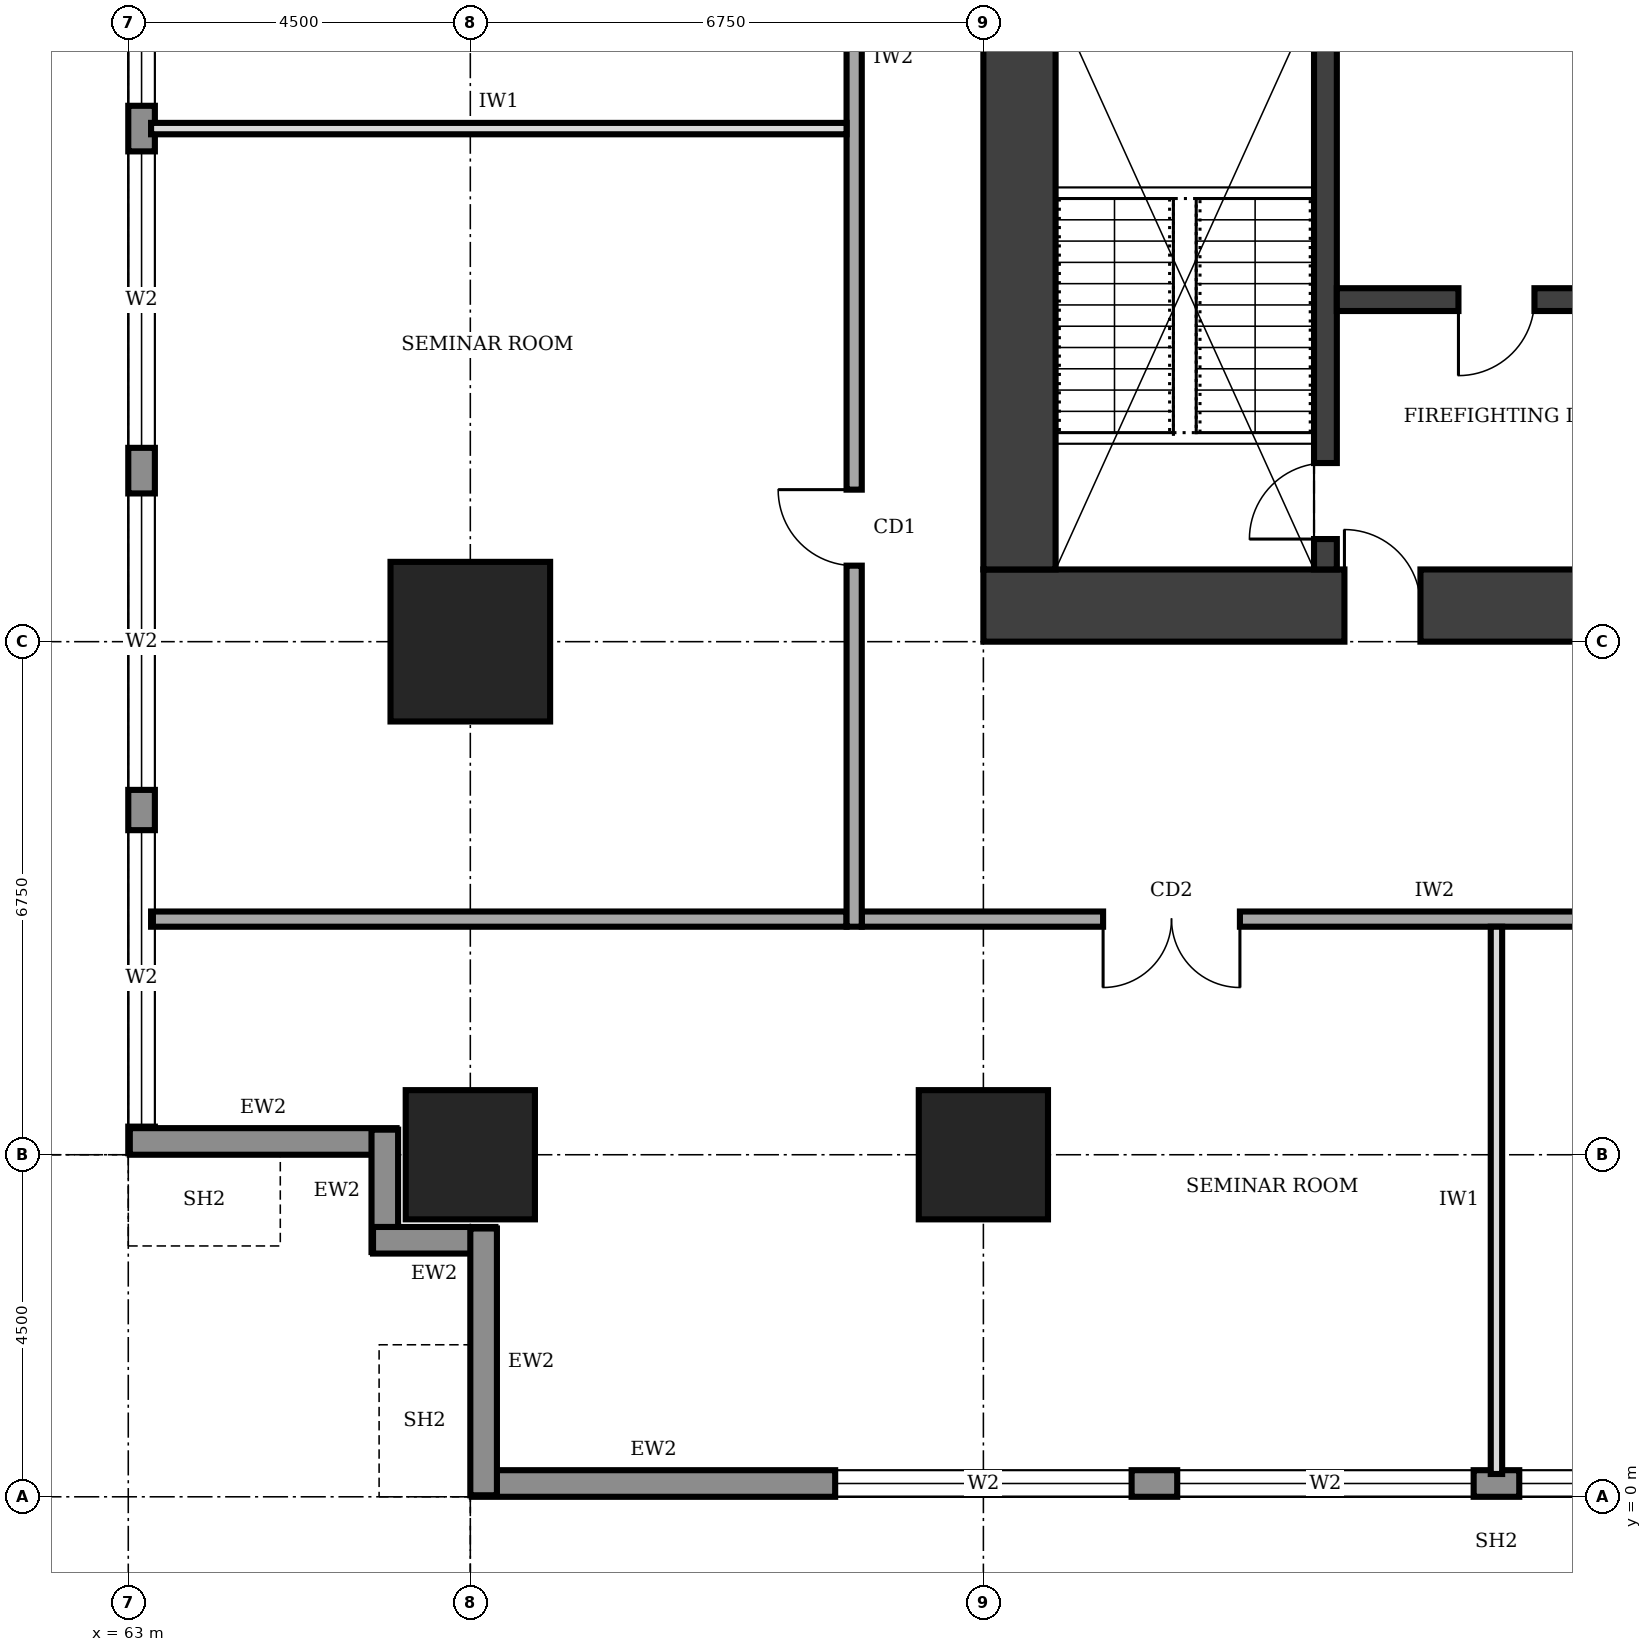
"""IFC4 building model, lengths in metres.
Left out: names, types, materials, properties, quantities, classifications, styles, units other than length and angle.
Written with IfcOpenShell. Run it as: python <this file> out.ifc"""

import sys

from ifc_helpers import new_model, si_unit, direction, frame, frame_2d, origin, origin_2d, place, context, subcontext, project, spatial, rectangle, extrude, element, fill, save


model = new_model("IFC4")
c1 = context("Model", 3, precision=1e-05, world=origin(), true_north=direction((0.0, 1.0)))
c2 = subcontext(c1, "Body", "Model", "MODEL_VIEW")
j1 = project(units=[si_unit("LENGTHUNIT", "METRE"), si_unit("PLANEANGLEUNIT", "RADIAN")], contexts=[c1])
p1 = place(None, origin())
s1 = spatial("IfcSite", under=j1, at=p1, CompositionType="ELEMENT")
p2 = place(p1, origin())
s2 = spatial("IfcBuilding", under=s1, at=p2, CompositionType="ELEMENT")
p3 = place(p2, frame((0.0, 0.0, 65.0)))
s3 = spatial("IfcBuildingStorey", under=s2, at=p3, CompositionType="ELEMENT", Elevation=65.0)
p4 = place(p3, frame((74.25, 11.725, 0.0), z_axis=(0.0, 0.0, 1.0), x_axis=(1.0, 0.0, 0.0)))
e1 = element("IfcWall", 1, at=p4, inside=s3, PredefinedType="SHEAR", context=c2, shape_type="SweptSolid", body=[
    extrude(rectangle(XDim=13.5, YDim=0.95, at=frame_2d((6.75, 0.0))), origin(), (0.0, 0.0, 1.0), 4.0),
])
p5 = place(p4, frame((4.75, 0.0, 0.0)))
e2 = element("IfcOpeningElement", 2, at=p5, cuts=e1, PredefinedType="OPENING", context=c2, shape_type="SweptSolid", body=[
    extrude(rectangle(XDim=1.0, YDim=2.1, at=frame_2d((0.5, 1.05))), frame((0.0, 0.485, 0.0), z_axis=(0.0, -1.0, 0.0), x_axis=(1.0, 0.0, 0.0)), (0.0, 0.0, 1.0), 0.97),
])
p6 = place(p3, frame((74.725, 28.3, 0.0), z_axis=(0.0, 0.0, 1.0), x_axis=(0.0, -1.0, 0.0)))
e3 = element("IfcWall", 3, at=p6, inside=s3, PredefinedType="SHEAR", context=c2, shape_type="SweptSolid", body=[
    extrude(rectangle(XDim=16.1, YDim=0.95, at=frame_2d((8.05, 0.0))), origin(), (0.0, 0.0, 1.0), 4.0),
])
p7 = place(p3, frame((78.75, 12.2, 0.0), z_axis=(0.0, 0.0, 1.0), x_axis=(0.0, 1.0, 0.0)))
e4 = element("IfcWall", 4, at=p7, inside=s3, PredefinedType="SHEAR", context=c2, shape_type="SweptSolid", body=[
    extrude(rectangle(XDim=16.1, YDim=0.3, at=frame_2d((8.05, 0.0))), origin(), (0.0, 0.0, 1.0), 4.0),
])
p8 = place(p7, frame((0.4, 0.0, 0.0)))
e5 = element("IfcOpeningElement", 5, at=p8, cuts=e4, PredefinedType="OPENING", context=c2, shape_type="SweptSolid", body=[
    extrude(rectangle(XDim=1.0, YDim=2.1, at=frame_2d((0.5, 1.05))), frame((0.0, 0.16, 0.0), z_axis=(0.0, -1.0, 0.0), x_axis=(1.0, 0.0, 0.0)), (0.0, 0.0, 1.0), 0.32),
])
p9 = place(p7, frame((9.0, 0.0, 0.0)))
e6 = element("IfcOpeningElement", 6, at=p9, cuts=e4, PredefinedType="OPENING", context=c2, shape_type="SweptSolid", body=[
    extrude(rectangle(XDim=1.1, YDim=2.1, at=frame_2d((0.55, 1.05))), frame((0.0, 0.16, 0.0), z_axis=(0.0, -1.0, 0.0), x_axis=(1.0, 0.0, 0.0)), (0.0, 0.0, 1.0), 0.32),
])
p10 = place(p7, frame((12.0, 0.0, 0.0)))
e7 = element("IfcOpeningElement", 7, at=p10, cuts=e4, PredefinedType="OPENING", context=c2, shape_type="SweptSolid", body=[
    extrude(rectangle(XDim=1.1, YDim=2.1, at=frame_2d((0.55, 1.05))), frame((0.0, 0.16, 0.0), z_axis=(0.0, -1.0, 0.0), x_axis=(1.0, 0.0, 0.0)), (0.0, 0.0, 1.0), 0.32),
])
p11 = place(p3, frame((78.9, 15.75, 0.0), z_axis=(0.0, 0.0, 1.0), x_axis=(1.0, 0.0, 0.0)))
e8 = element("IfcWall", 8, at=p11, inside=s3, PredefinedType="SHEAR", context=c2, shape_type="SweptSolid", body=[
    extrude(rectangle(XDim=4.2, YDim=0.3, at=frame_2d((2.1, 0.0))), origin(), (0.0, 0.0, 1.0), 4.0),
])
p12 = place(p11, frame((1.6, 0.0, 0.0)))
e9 = element("IfcOpeningElement", 9, at=p12, cuts=e8, PredefinedType="OPENING", context=c2, shape_type="SweptSolid", body=[
    extrude(rectangle(XDim=1.0, YDim=2.1, at=frame_2d((0.5, 1.05))), frame((0.0, 0.16, 0.0), z_axis=(0.0, -1.0, 0.0), x_axis=(1.0, 0.0, 0.0)), (0.0, 0.0, 1.0), 0.32),
])
for number, where, z_axis, x_axis in (
    (10, (67.5, 4.5, 0.0), (0.0, 0.0, 1.0), (1.0, 0.0, 0.0)),
    (11, (74.25, 4.5, 0.0), (0.0, 0.0, 1.0), (1.0, 0.0, 0.0)),
):
    element("IfcColumn", number, at=place(p3, frame(where, z_axis=z_axis, x_axis=x_axis)), inside=s3, PredefinedType="COLUMN", context=c2, shape_type="SweptSolid", body=[
        extrude(rectangle(XDim=1.7, YDim=1.7, at=origin_2d()), origin(), (0.0, 0.0, 1.0), 4.0),
    ])
p13 = place(p3, frame((67.5, 11.25, 0.0), z_axis=(0.0, 0.0, 1.0), x_axis=(1.0, 0.0, 0.0)))
e12 = element("IfcColumn", 12, at=p13, inside=s3, PredefinedType="COLUMN", context=c2, shape_type="SweptSolid", body=[
    extrude(rectangle(XDim=2.1, YDim=2.1, at=origin_2d()), origin(), (0.0, 0.0, 1.0), 4.0),
])
p14 = place(p3, frame((67.52, 0.175, 0.0), z_axis=(0.0, 0.0, 1.0), x_axis=(1.0, 0.0, 0.0)))
e13 = element("IfcWall", 13, at=p14, inside=s3, PredefinedType="STANDARD", context=c2, shape_type="SweptSolid", body=[
    extrude(rectangle(XDim=26.96, YDim=0.35, at=frame_2d((13.48, 0.0))), origin(), (0.0, 0.0, 1.0), 3.75),
])
p15 = place(p14, frame((4.78, 0.0, 0.6)))
e14 = element("IfcOpeningElement", 14, at=p15, cuts=e13, PredefinedType="OPENING", context=c2, shape_type="SweptSolid", body=[
    extrude(rectangle(XDim=3.9, YDim=2.6, at=frame_2d((1.95, 1.3))), frame((0.0, 0.185, 0.0), z_axis=(0.0, -1.0, 0.0), x_axis=(1.0, 0.0, 0.0)), (0.0, 0.0, 1.0), 0.37),
])
p16 = place(p14, frame((9.28, 0.0, 0.6)))
e15 = element("IfcOpeningElement", 15, at=p16, cuts=e13, PredefinedType="OPENING", context=c2, shape_type="SweptSolid", body=[
    extrude(rectangle(XDim=3.9, YDim=2.6, at=frame_2d((1.95, 1.3))), frame((0.0, 0.185, 0.0), z_axis=(0.0, -1.0, 0.0), x_axis=(1.0, 0.0, 0.0)), (0.0, 0.0, 1.0), 0.37),
])
p17 = place(p14, frame((13.78, 0.0, 0.6)))
e16 = element("IfcOpeningElement", 16, at=p17, cuts=e13, PredefinedType="OPENING", context=c2, shape_type="SweptSolid", body=[
    extrude(rectangle(XDim=3.9, YDim=2.6, at=frame_2d((1.95, 1.3))), frame((0.0, 0.185, 0.0), z_axis=(0.0, -1.0, 0.0), x_axis=(1.0, 0.0, 0.0)), (0.0, 0.0, 1.0), 0.37),
])
p18 = place(p14, frame((18.28, 0.0, 0.6)))
e17 = element("IfcOpeningElement", 17, at=p18, cuts=e13, PredefinedType="OPENING", context=c2, shape_type="SweptSolid", body=[
    extrude(rectangle(XDim=3.9, YDim=2.6, at=frame_2d((1.95, 1.3))), frame((0.0, 0.185, 0.0), z_axis=(0.0, -1.0, 0.0), x_axis=(1.0, 0.0, 0.0)), (0.0, 0.0, 1.0), 0.37),
])
p19 = place(p14, frame((22.71, 0.0, 0.6)))
e18 = element("IfcOpeningElement", 18, at=p19, cuts=e13, PredefinedType="OPENING", context=c2, shape_type="SweptSolid", body=[
    extrude(rectangle(XDim=3.9, YDim=2.6, at=frame_2d((1.95, 1.3))), frame((0.0, 0.185, 0.0), z_axis=(0.0, -1.0, 0.0), x_axis=(1.0, 0.0, 0.0)), (0.0, 0.0, 1.0), 0.37),
])
p20 = place(p3, frame((63.175, 35.98, 0.0), z_axis=(0.0, 0.0, 1.0), x_axis=(0.0, -1.0, 0.0)))
e19 = element("IfcWall", 19, at=p20, inside=s3, PredefinedType="STANDARD", context=c2, shape_type="SweptSolid", body=[
    extrude(rectangle(XDim=31.46, YDim=0.35, at=frame_2d((15.73, 0.0))), origin(), (0.0, 0.0, 1.0), 3.75),
])
p21 = place(p20, frame((27.21, 0.0, 0.6)))
e20 = element("IfcOpeningElement", 20, at=p21, cuts=e19, PredefinedType="OPENING", context=c2, shape_type="SweptSolid", body=[
    extrude(rectangle(XDim=3.9, YDim=2.6, at=frame_2d((1.95, 1.3))), frame((0.0, 0.185, 0.0), z_axis=(0.0, -1.0, 0.0), x_axis=(1.0, 0.0, 0.0)), (0.0, 0.0, 1.0), 0.37),
])
p22 = place(p20, frame((22.78, 0.0, 0.6)))
e21 = element("IfcOpeningElement", 21, at=p22, cuts=e19, PredefinedType="OPENING", context=c2, shape_type="SweptSolid", body=[
    extrude(rectangle(XDim=3.9, YDim=2.6, at=frame_2d((1.95, 1.3))), frame((0.0, 0.185, 0.0), z_axis=(0.0, -1.0, 0.0), x_axis=(1.0, 0.0, 0.0)), (0.0, 0.0, 1.0), 0.37),
])
p23 = place(p20, frame((18.28, 0.0, 0.6)))
e22 = element("IfcOpeningElement", 22, at=p23, cuts=e19, PredefinedType="OPENING", context=c2, shape_type="SweptSolid", body=[
    extrude(rectangle(XDim=3.9, YDim=2.6, at=frame_2d((1.95, 1.3))), frame((0.0, 0.185, 0.0), z_axis=(0.0, -1.0, 0.0), x_axis=(1.0, 0.0, 0.0)), (0.0, 0.0, 1.0), 0.37),
])
p24 = place(p20, frame((13.78, 0.0, 0.6)))
e23 = element("IfcOpeningElement", 23, at=p24, cuts=e19, PredefinedType="OPENING", context=c2, shape_type="SweptSolid", body=[
    extrude(rectangle(XDim=3.9, YDim=2.6, at=frame_2d((1.95, 1.3))), frame((0.0, 0.185, 0.0), z_axis=(0.0, -1.0, 0.0), x_axis=(1.0, 0.0, 0.0)), (0.0, 0.0, 1.0), 0.37),
])
p25 = place(p20, frame((9.28, 0.0, 0.6)))
e24 = element("IfcOpeningElement", 24, at=p25, cuts=e19, PredefinedType="OPENING", context=c2, shape_type="SweptSolid", body=[
    extrude(rectangle(XDim=3.9, YDim=2.6, at=frame_2d((1.95, 1.3))), frame((0.0, 0.185, 0.0), z_axis=(0.0, -1.0, 0.0), x_axis=(1.0, 0.0, 0.0)), (0.0, 0.0, 1.0), 0.37),
])
p26 = place(p20, frame((4.78, 0.0, 0.6)))
e25 = element("IfcOpeningElement", 25, at=p26, cuts=e19, PredefinedType="OPENING", context=c2, shape_type="SweptSolid", body=[
    extrude(rectangle(XDim=3.9, YDim=2.6, at=frame_2d((1.95, 1.3))), frame((0.0, 0.185, 0.0), z_axis=(0.0, -1.0, 0.0), x_axis=(1.0, 0.0, 0.0)), (0.0, 0.0, 1.0), 0.37),
])
p27 = place(p3, frame((63.02, 4.675, 0.0), z_axis=(0.0, 0.0, 1.0), x_axis=(1.0, 0.0, 0.0)))
e26 = element("IfcWall", 26, at=p27, inside=s3, PredefinedType="STANDARD", context=c2, shape_type="SweptSolid", body=[
    extrude(rectangle(XDim=3.51, YDim=0.35, at=frame_2d((1.755, 0.0))), origin(), (0.0, 0.0, 1.0), 2.85),
])
for number, where, z_axis, x_axis in (
    (27, (66.375, 4.83, 0.0), (0.0, 0.0, 1.0), (0.0, -1.0, 0.0)),
    (28, (66.22, 3.375, 0.0), (0.0, 0.0, 1.0), (1.0, 0.0, 0.0)),
):
    element("IfcWall", number, at=place(p3, frame(where, z_axis=z_axis, x_axis=x_axis)), inside=s3, PredefinedType="STANDARD", context=c2, shape_type="SweptSolid", body=[
        extrude(rectangle(XDim=1.61, YDim=0.35, at=frame_2d((0.805, 0.0))), origin(), (0.0, 0.0, 1.0), 3.75),
    ])
p28 = place(p3, frame((67.675, 3.53, 0.0), z_axis=(0.0, 0.0, 1.0), x_axis=(0.0, -1.0, 0.0)))
e29 = element("IfcWall", 29, at=p28, inside=s3, PredefinedType="STANDARD", context=c2, shape_type="SweptSolid", body=[
    extrude(rectangle(XDim=3.51, YDim=0.35, at=frame_2d((1.755, 0.0))), origin(), (0.0, 0.0, 1.0), 2.85),
])
p29 = place(p3, frame((72.65, 7.6, 0.0), z_axis=(0.0, 0.0, 1.0), x_axis=(1.0, 0.0, 0.0)))
e30 = element("IfcWall", 30, at=p29, inside=s3, PredefinedType="SOLIDWALL", context=c2, shape_type="SweptSolid", body=[
    extrude(rectangle(XDim=16.9, YDim=0.2, at=frame_2d((8.45, 0.0))), origin(), (0.0, 0.0, 1.0), 3.75),
])
p30 = place(p29, frame((3.175, 0.0, 0.0)))
e31 = element("IfcOpeningElement", 31, at=p30, cuts=e30, PredefinedType="OPENING", context=c2, shape_type="SweptSolid", body=[
    extrude(rectangle(XDim=1.8, YDim=2.1, at=frame_2d((0.9, 1.05))), frame((0.0, 0.11, 0.0), z_axis=(0.0, -1.0, 0.0), x_axis=(1.0, 0.0, 0.0)), (0.0, 0.0, 1.0), 0.22),
])
p31 = place(p29, frame((10.1, 0.0, 0.0)))
e32 = element("IfcOpeningElement", 32, at=p31, cuts=e30, PredefinedType="OPENING", context=c2, shape_type="SweptSolid", body=[
    extrude(rectangle(XDim=1.0, YDim=2.1, at=frame_2d((0.5, 1.05))), frame((0.0, 0.11, 0.0), z_axis=(0.0, -1.0, 0.0), x_axis=(1.0, 0.0, 0.0)), (0.0, 0.0, 1.0), 0.22),
])
p32 = place(p29, frame((14.375, 0.0, 0.0)))
e33 = element("IfcOpeningElement", 33, at=p32, cuts=e30, PredefinedType="OPENING", context=c2, shape_type="SweptSolid", body=[
    extrude(rectangle(XDim=1.0, YDim=2.1, at=frame_2d((0.5, 1.05))), frame((0.0, 0.11, 0.0), z_axis=(0.0, -1.0, 0.0), x_axis=(1.0, 0.0, 0.0)), (0.0, 0.0, 1.0), 0.22),
])
p33 = place(p3, frame((72.55, 32.8, 0.0), z_axis=(0.0, 0.0, 1.0), x_axis=(0.0, -1.0, 0.0)))
e34 = element("IfcWall", 34, at=p33, inside=s3, PredefinedType="SOLIDWALL", context=c2, shape_type="SweptSolid", body=[
    extrude(rectangle(XDim=25.3, YDim=0.2, at=frame_2d((12.65, 0.0))), origin(), (0.0, 0.0, 1.0), 3.75),
])
p34 = place(p33, frame((19.55, 0.0, 0.0)))
e35 = element("IfcOpeningElement", 35, at=p34, cuts=e34, PredefinedType="OPENING", context=c2, shape_type="SweptSolid", body=[
    extrude(rectangle(XDim=1.0, YDim=2.1, at=frame_2d((0.5, 1.05))), frame((0.0, 0.11, 0.0), z_axis=(0.0, -1.0, 0.0), x_axis=(1.0, 0.0, 0.0)), (0.0, 0.0, 1.0), 0.22),
])
p35 = place(p33, frame((6.4, 0.0, 0.0)))
e36 = element("IfcOpeningElement", 36, at=p35, cuts=e34, PredefinedType="OPENING", context=c2, shape_type="SweptSolid", body=[
    extrude(rectangle(XDim=1.8, YDim=2.1, at=frame_2d((0.9, 1.05))), frame((0.0, 0.11, 0.0), z_axis=(0.0, -1.0, 0.0), x_axis=(1.0, 0.0, 0.0)), (0.0, 0.0, 1.0), 0.22),
])
p36 = place(p3, frame((63.3, 7.6, 0.0), z_axis=(0.0, 0.0, 1.0), x_axis=(1.0, 0.0, 0.0)))
e37 = element("IfcWall", 37, at=p36, inside=s3, PredefinedType="SOLIDWALL", context=c2, shape_type="SweptSolid", body=[
    extrude(rectangle(XDim=9.15, YDim=0.2, at=frame_2d((4.575, 0.0))), origin(), (0.0, 0.0, 1.0), 3.75),
])
p37 = place(p3, frame((81.0, 0.3, 0.0), z_axis=(0.0, 0.0, 1.0), x_axis=(0.0, 1.0, 0.0)))
e38 = element("IfcWall", 38, at=p37, inside=s3, PredefinedType="PARTITIONING", context=c2, shape_type="SweptSolid", body=[
    extrude(rectangle(XDim=7.2, YDim=0.15, at=frame_2d((3.6, 0.0))), origin(), (0.0, 0.0, 1.0), 3.75),
])
p38 = place(p3, frame((63.3, 18.0, 0.0), z_axis=(0.0, 0.0, 1.0), x_axis=(1.0, 0.0, 0.0)))
e39 = element("IfcWall", 39, at=p38, inside=s3, PredefinedType="PARTITIONING", context=c2, shape_type="SweptSolid", body=[
    extrude(rectangle(XDim=9.15, YDim=0.15, at=frame_2d((4.575, 0.0))), origin(), (0.0, 0.0, 1.0), 3.75),
])
p39 = place(p15, origin())
e40 = element("IfcWindow", 40, at=p39, inside=s3, PartitioningType="SINGLE_PANEL", PredefinedType="WINDOW", context=c2, shape_type="SweptSolid", body=[
    extrude(rectangle(XDim=3.9, YDim=2.6, at=frame_2d((1.95, 1.3))), frame((0.0, 0.03, 0.0), z_axis=(0.0, -1.0, 0.0), x_axis=(1.0, 0.0, 0.0)), (0.0, 0.0, 1.0), 0.06),
])
fill(e14, e40)
p40 = place(p16, origin())
e41 = element("IfcWindow", 41, at=p40, inside=s3, PartitioningType="SINGLE_PANEL", PredefinedType="WINDOW", context=c2, shape_type="SweptSolid", body=[
    extrude(rectangle(XDim=3.9, YDim=2.6, at=frame_2d((1.95, 1.3))), frame((0.0, 0.03, 0.0), z_axis=(0.0, -1.0, 0.0), x_axis=(1.0, 0.0, 0.0)), (0.0, 0.0, 1.0), 0.06),
])
fill(e15, e41)
p41 = place(p17, origin())
e42 = element("IfcWindow", 42, at=p41, inside=s3, PartitioningType="SINGLE_PANEL", PredefinedType="WINDOW", context=c2, shape_type="SweptSolid", body=[
    extrude(rectangle(XDim=3.9, YDim=2.6, at=frame_2d((1.95, 1.3))), frame((0.0, 0.03, 0.0), z_axis=(0.0, -1.0, 0.0), x_axis=(1.0, 0.0, 0.0)), (0.0, 0.0, 1.0), 0.06),
])
fill(e16, e42)
p42 = place(p21, origin())
e43 = element("IfcWindow", 43, at=p42, inside=s3, PartitioningType="SINGLE_PANEL", PredefinedType="WINDOW", context=c2, shape_type="SweptSolid", body=[
    extrude(rectangle(XDim=3.9, YDim=2.6, at=frame_2d((1.95, 1.3))), frame((0.0, 0.03, 0.0), z_axis=(0.0, -1.0, 0.0), x_axis=(1.0, 0.0, 0.0)), (0.0, 0.0, 1.0), 0.06),
])
fill(e20, e43)
p43 = place(p22, origin())
e44 = element("IfcWindow", 44, at=p43, inside=s3, PartitioningType="SINGLE_PANEL", PredefinedType="WINDOW", context=c2, shape_type="SweptSolid", body=[
    extrude(rectangle(XDim=3.9, YDim=2.6, at=frame_2d((1.95, 1.3))), frame((0.0, 0.03, 0.0), z_axis=(0.0, -1.0, 0.0), x_axis=(1.0, 0.0, 0.0)), (0.0, 0.0, 1.0), 0.06),
])
fill(e21, e44)
p44 = place(p23, origin())
e45 = element("IfcWindow", 45, at=p44, inside=s3, PartitioningType="SINGLE_PANEL", PredefinedType="WINDOW", context=c2, shape_type="SweptSolid", body=[
    extrude(rectangle(XDim=3.9, YDim=2.6, at=frame_2d((1.95, 1.3))), frame((0.0, 0.03, 0.0), z_axis=(0.0, -1.0, 0.0), x_axis=(1.0, 0.0, 0.0)), (0.0, 0.0, 1.0), 0.06),
])
fill(e22, e45)
p45 = place(p24, origin())
e46 = element("IfcWindow", 46, at=p45, inside=s3, PartitioningType="SINGLE_PANEL", PredefinedType="WINDOW", context=c2, shape_type="SweptSolid", body=[
    extrude(rectangle(XDim=3.9, YDim=2.6, at=frame_2d((1.95, 1.3))), frame((0.0, 0.03, 0.0), z_axis=(0.0, -1.0, 0.0), x_axis=(1.0, 0.0, 0.0)), (0.0, 0.0, 1.0), 0.06),
])
fill(e23, e46)
p46 = place(p5, origin())
e47 = element("IfcDoor", 47, at=p46, inside=s3, OperationType="SINGLE_SWING_LEFT", PredefinedType="DOOR", context=c2, shape_type="SweptSolid", body=[
    extrude(rectangle(XDim=1.0, YDim=2.1, at=frame_2d((0.5, 1.05))), frame((0.0, 0.025, 0.0), z_axis=(0.0, -1.0, 0.0), x_axis=(1.0, 0.0, 0.0)), (0.0, 0.0, 1.0), 0.05),
])
fill(e2, e47)
p47 = place(p12, frame((1.0, 0.0, 0.0), z_axis=(0.0, 0.0, 1.0), x_axis=(-1.0, 0.0, 0.0)))
e48 = element("IfcDoor", 48, at=p47, inside=s3, OperationType="SINGLE_SWING_RIGHT", PredefinedType="DOOR", context=c2, shape_type="SweptSolid", body=[
    extrude(rectangle(XDim=1.0, YDim=2.1, at=frame_2d((0.5, 1.05))), frame((0.0, 0.025, 0.0), z_axis=(0.0, -1.0, 0.0), x_axis=(1.0, 0.0, 0.0)), (0.0, 0.0, 1.0), 0.05),
])
fill(e9, e48)
p48 = place(p8, origin())
e49 = element("IfcDoor", 49, at=p48, inside=s3, OperationType="SINGLE_SWING_LEFT", PredefinedType="DOOR", context=c2, shape_type="SweptSolid", body=[
    extrude(rectangle(XDim=1.0, YDim=2.1, at=frame_2d((0.5, 1.05))), frame((0.0, 0.025, 0.0), z_axis=(0.0, -1.0, 0.0), x_axis=(1.0, 0.0, 0.0)), (0.0, 0.0, 1.0), 0.05),
])
fill(e5, e49)
p49 = place(p30, frame((1.8, 0.0, 0.0), z_axis=(0.0, 0.0, 1.0), x_axis=(-1.0, 0.0, 0.0)))
e50 = element("IfcDoor", 50, at=p49, inside=s3, OperationType="DOUBLE_DOOR_SINGLE_SWING", PredefinedType="DOOR", context=c2, shape_type="SweptSolid", body=[
    extrude(rectangle(XDim=1.8, YDim=2.1, at=frame_2d((0.9, 1.05))), frame((0.0, 0.025, 0.0), z_axis=(0.0, -1.0, 0.0), x_axis=(1.0, 0.0, 0.0)), (0.0, 0.0, 1.0), 0.05),
])
fill(e31, e50)
p50 = place(p34, frame((1.0, 0.0, 0.0), z_axis=(0.0, 0.0, 1.0), x_axis=(-1.0, 0.0, 0.0)))
e51 = element("IfcDoor", 51, at=p50, inside=s3, OperationType="SINGLE_SWING_RIGHT", PredefinedType="DOOR", context=c2, shape_type="SweptSolid", body=[
    extrude(rectangle(XDim=1.0, YDim=2.1, at=frame_2d((0.5, 1.05))), frame((0.0, 0.025, 0.0), z_axis=(0.0, -1.0, 0.0), x_axis=(1.0, 0.0, 0.0)), (0.0, 0.0, 1.0), 0.05),
])
fill(e35, e51)
save(model, sys.argv[1])
